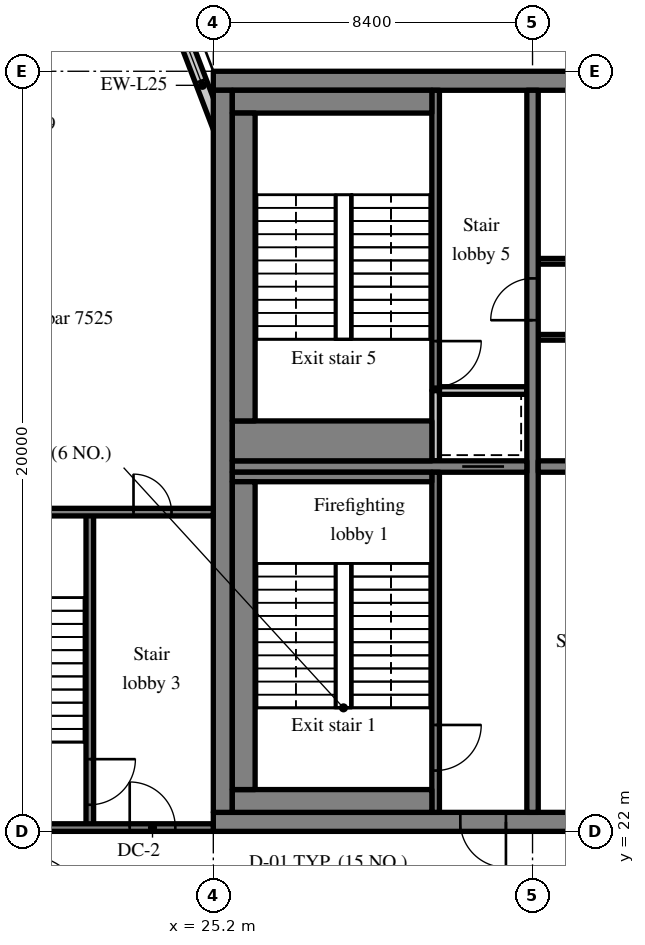
"""IFC4 building model, lengths in metres.
Left out: names, types, materials, properties, quantities, classifications, styles, units other than length and angle.
Written with IfcOpenShell. Run it as: python <this file> out.ifc"""

import sys

from ifc_helpers import new_model, si_unit, direction, frame, frame_2d, origin, place, context, subcontext, project, spatial, rectangle, extrude, source, transform, mapped, element, fill, save


model = new_model("IFC4")
c1 = context("Model", 3, precision=1e-05, world=origin(), true_north=direction((0.0, 1.0)))
c2 = subcontext(c1, "Body", "Model", "MODEL_VIEW")
j1 = project(units=[si_unit("LENGTHUNIT", "METRE"), si_unit("PLANEANGLEUNIT", "RADIAN")], contexts=[c1])
p1 = place(None, origin())
s1 = spatial("IfcSite", under=j1, at=p1, CompositionType="ELEMENT")
p2 = place(p1, origin())
s2 = spatial("IfcBuilding", under=s1, at=p2, CompositionType="ELEMENT")
p3 = place(p2, frame((0.0, 0.0, 313.7)))
s3 = spatial("IfcBuildingStorey", under=s2, at=p3, CompositionType="ELEMENT", Elevation=313.7)
m1 = source(origin(), c2, "Body", "SweptSolid", [
    extrude(rectangle(XDim=50.4, YDim=0.5, at=frame_2d((25.2, 0.0))), origin(), (0.0, 0.0, 1.0), 3.72),
])
p4 = place(p3, frame((25.2, 22.25, 0.0), z_axis=(0.0, 0.0, 1.0), x_axis=(1.0, 0.0, 0.0)))
e1 = element("IfcWall", 1, at=p4, inside=s3, PredefinedType="SHEAR", context=c2, shape_type="MappedRepresentation", body=[
    mapped(m1, transform((0.0, 0.0, 0.0), scale=1.0)),
])
m2 = source(origin(), c2, "Body", "SweptSolid", [
    extrude(rectangle(XDim=1.8, YDim=2.1, at=frame_2d((0.9, 1.05))), frame((0.0, 0.26, 0.0), z_axis=(0.0, -1.0, 0.0), x_axis=(1.0, 0.0, 0.0)), (0.0, 0.0, 1.0), 0.52),
])
p5 = place(p4, frame((15.9, 0.0, 0.0)))
e2 = element("IfcOpeningElement", 2, at=p5, cuts=e1, PredefinedType="OPENING", context=c2, shape_type="MappedRepresentation", body=[
    mapped(m2, transform((0.0, 0.0, 0.0), scale=1.0)),
])
m3 = source(origin(), c2, "Body", "SweptSolid", [
    extrude(rectangle(XDim=0.9, YDim=2.1, at=frame_2d((0.45, 1.05))), frame((0.0, 0.26, 0.0), z_axis=(0.0, -1.0, 0.0), x_axis=(1.0, 0.0, 0.0)), (0.0, 0.0, 1.0), 0.52),
])
p6 = place(p4, frame((9.675, 0.0, 0.0)))
e3 = element("IfcOpeningElement", 3, at=p6, cuts=e1, PredefinedType="OPENING", context=c2, shape_type="MappedRepresentation", body=[
    mapped(m3, transform((0.0, 0.0, 0.0), scale=1.0)),
])
p7 = place(p4, frame((21.525, 0.0, 0.0)))
e4 = element("IfcOpeningElement", 4, at=p7, cuts=e1, PredefinedType="OPENING", context=c2, shape_type="MappedRepresentation", body=[
    mapped(m3, transform((0.0, 0.0, 0.0), scale=1.0)),
])
p8 = place(p4, frame((32.7, 0.0, 0.0)))
e5 = element("IfcOpeningElement", 5, at=p8, cuts=e1, PredefinedType="OPENING", context=c2, shape_type="MappedRepresentation", body=[
    mapped(m2, transform((0.0, 0.0, 0.0), scale=1.0)),
])
m4 = source(origin(), c2, "Body", "SweptSolid", [
    extrude(rectangle(XDim=1.2, YDim=2.1, at=frame_2d((0.6, 1.05))), frame((0.0, 0.26, 0.0), z_axis=(0.0, -1.0, 0.0), x_axis=(1.0, 0.0, 0.0)), (0.0, 0.0, 1.0), 0.52),
])
p9 = place(p4, frame((6.5, 0.0, 0.0)))
e6 = element("IfcOpeningElement", 6, at=p9, cuts=e1, PredefinedType="OPENING", context=c2, shape_type="MappedRepresentation", body=[
    mapped(m4, transform((0.0, 0.0, 0.0), scale=1.0)),
])
p10 = place(p4, frame((47.975, 0.0, 0.0)))
e7 = element("IfcOpeningElement", 7, at=p10, cuts=e1, PredefinedType="OPENING", context=c2, shape_type="MappedRepresentation", body=[
    mapped(m4, transform((0.0, 0.0, 0.0), scale=1.0)),
])
p11 = place(p3, frame((25.2, 41.75, 0.0), z_axis=(0.0, 0.0, 1.0), x_axis=(1.0, 0.0, 0.0)))
e8 = element("IfcWall", 8, at=p11, inside=s3, PredefinedType="SHEAR", context=c2, shape_type="MappedRepresentation", body=[
    mapped(m1, transform((0.0, 0.0, 0.0), scale=1.0)),
])
m5 = source(origin(), c2, "Body", "SweptSolid", [
    extrude(rectangle(XDim=19.0, YDim=0.5, at=frame_2d((9.5, 0.0))), origin(), (0.0, 0.0, 1.0), 3.72),
])
p12 = place(p3, frame((25.45, 22.5, 0.0), z_axis=(0.0, 0.0, 1.0), x_axis=(0.0, 1.0, 0.0)))
e9 = element("IfcWall", 9, at=p12, inside=s3, PredefinedType="SHEAR", context=c2, shape_type="MappedRepresentation", body=[
    mapped(m5, transform((0.0, 0.0, 0.0), scale=1.0)),
])
m6 = source(origin(), c2, "Body", "SweptSolid", [
    extrude(rectangle(XDim=19.0, YDim=0.3, at=frame_2d((9.5, 0.0))), origin(), (0.0, 0.0, 1.0), 3.72),
])
p13 = place(p3, frame((33.6, 22.5, 0.0), z_axis=(0.0, 0.0, 1.0), x_axis=(0.0, 1.0, 0.0)))
e10 = element("IfcWall", 10, at=p13, inside=s3, PredefinedType="SHEAR", context=c2, shape_type="MappedRepresentation", body=[
    mapped(m6, transform((0.0, 0.0, 0.0), scale=1.0)),
])
m7 = source(origin(), c2, "Body", "SweptSolid", [
    extrude(rectangle(XDim=1.1, YDim=2.1, at=frame_2d((0.55, 1.05))), frame((0.0, 0.16, 0.0), z_axis=(0.0, -1.0, 0.0), x_axis=(1.0, 0.0, 0.0)), (0.0, 0.0, 1.0), 0.32),
])
p14 = place(p13, frame((12.95, 0.0, 0.0)))
e11 = element("IfcOpeningElement", 11, at=p14, cuts=e10, PredefinedType="OPENING", context=c2, shape_type="MappedRepresentation", body=[
    mapped(m7, transform((0.0, 0.0, 0.0), scale=1.0)),
])
m8 = source(origin(), c2, "Body", "SweptSolid", [
    extrude(rectangle(XDim=7.75, YDim=0.3, at=frame_2d((3.875, 0.0))), origin(), (0.0, 0.0, 1.0), 3.72),
])
p15 = place(p3, frame((25.7, 31.6, 0.0), z_axis=(0.0, 0.0, 1.0), x_axis=(1.0, 0.0, 0.0)))
e12 = element("IfcWall", 12, at=p15, inside=s3, PredefinedType="SHEAR", context=c2, shape_type="MappedRepresentation", body=[
    mapped(m8, transform((0.0, 0.0, 0.0), scale=1.0)),
])
p16 = place(p15, frame((6.05, 0.0, 0.0)))
e13 = element("IfcOpeningElement", 13, at=p16, cuts=e12, PredefinedType="OPENING", context=c2, shape_type="MappedRepresentation", body=[
    mapped(m7, transform((0.0, 0.0, 0.0), scale=1.0)),
])
m9 = source(origin(), c2, "Body", "SweptSolid", [
    extrude(rectangle(XDim=16.5, YDim=0.3, at=frame_2d((8.25, 0.0))), origin(), (0.0, 0.0, 1.0), 3.72),
])
p17 = place(p3, frame((33.75, 31.6, 0.0), z_axis=(0.0, 0.0, 1.0), x_axis=(1.0, 0.0, 0.0)))
e14 = element("IfcWall", 14, at=p17, inside=s3, PredefinedType="SHEAR", context=c2, shape_type="MappedRepresentation", body=[
    mapped(m9, transform((0.0, 0.0, 0.0), scale=1.0)),
])
m10 = source(origin(), c2, "Body", "SweptSolid", [
    extrude(rectangle(XDim=1.0, YDim=2.1, at=frame_2d((0.5, 1.05))), frame((0.0, 0.16, 0.0), z_axis=(0.0, -1.0, 0.0), x_axis=(1.0, 0.0, 0.0)), (0.0, 0.0, 1.0), 0.32),
])
p18 = place(p17, frame((14.875, 0.0, 0.0)))
e15 = element("IfcOpeningElement", 15, at=p18, cuts=e14, PredefinedType="OPENING", context=c2, shape_type="MappedRepresentation", body=[
    mapped(m10, transform((0.0, 0.0, 0.0), scale=1.0)),
])
m11 = source(origin(), c2, "Body", "SweptSolid", [
    extrude(rectangle(XDim=3.559, YDim=0.3, at=frame_2d((1.78, 0.0))), origin(), (0.0, 0.0, 1.0), 3.72),
])
p19 = place(p3, frame((25.55, 39.969, 0.0), z_axis=(0.0, 0.0, 1.0), x_axis=(-0.35779745313, 0.933799219604, 0.0)))
e16 = element("IfcWall", 16, at=p19, inside=s3, PredefinedType="SOLIDWALL", context=c2, shape_type="MappedRepresentation", body=[
    mapped(m11, transform((0.0, 0.0, 0.0), scale=1.0)),
])
m12 = source(origin(), c2, "Body", "SweptSolid", [
    extrude(rectangle(XDim=1.5, YDim=2.0, at=frame_2d((0.75, 1.0))), frame((0.0, 0.16, 0.0), z_axis=(0.0, -1.0, 0.0), x_axis=(1.0, 0.0, 0.0)), (0.0, 0.0, 1.0), 0.32),
])
p20 = place(p19, frame((1.903, 0.0, 0.9)))
e17 = element("IfcOpeningElement", 17, at=p20, cuts=e16, PredefinedType="OPENING", context=c2, shape_type="MappedRepresentation", body=[
    mapped(m12, transform((0.0, 0.0, 0.0), scale=1.0)),
])
m13 = source(origin(), c2, "Body", "SweptSolid", [
    extrude(rectangle(XDim=14.25, YDim=0.15, at=frame_2d((7.125, 0.0))), origin(), (0.0, 0.0, 1.0), 3.72),
])
p21 = place(p3, frame((33.75, 35.0, 0.0), z_axis=(0.0, 0.0, 1.0), x_axis=(1.0, 0.0, 0.0)))
e18 = element("IfcWall", 18, at=p21, inside=s3, PredefinedType="PARTITIONING", context=c2, shape_type="MappedRepresentation", body=[
    mapped(m13, transform((0.0, 0.0, 0.0), scale=1.0)),
])
m14 = source(origin(), c2, "Body", "SweptSolid", [
    extrude(rectangle(XDim=0.9, YDim=2.1, at=frame_2d((0.45, 1.05))), frame((0.0, 0.085, 0.0), z_axis=(0.0, -1.0, 0.0), x_axis=(1.0, 0.0, 0.0)), (0.0, 0.0, 1.0), 0.17),
])
p22 = place(p21, frame((0.968, 0.0, 0.0)))
e19 = element("IfcOpeningElement", 19, at=p22, cuts=e18, PredefinedType="OPENING", context=c2, shape_type="MappedRepresentation", body=[
    mapped(m14, transform((0.0, 0.0, 0.0), scale=1.0)),
])
p23 = place(p21, frame((5.929, 0.0, 0.0)))
e20 = element("IfcOpeningElement", 20, at=p23, cuts=e18, PredefinedType="OPENING", context=c2, shape_type="MappedRepresentation", body=[
    mapped(m14, transform((0.0, 0.0, 0.0), scale=1.0)),
])
p24 = place(p21, frame((11.599, 0.0, 0.0)))
e21 = element("IfcOpeningElement", 21, at=p24, cuts=e18, PredefinedType="OPENING", context=c2, shape_type="MappedRepresentation", body=[
    mapped(m14, transform((0.0, 0.0, 0.0), scale=1.0)),
])
m15 = source(origin(), c2, "Body", "SweptSolid", [
    extrude(rectangle(XDim=16.5, YDim=0.15, at=frame_2d((8.25, 0.0))), origin(), (0.0, 0.0, 1.0), 3.72),
])
p25 = place(p3, frame((33.75, 37.0, 0.0), z_axis=(0.0, 0.0, 1.0), x_axis=(1.0, 0.0, 0.0)))
e22 = element("IfcWall", 22, at=p25, inside=s3, PredefinedType="PARTITIONING", context=c2, shape_type="MappedRepresentation", body=[
    mapped(m15, transform((0.0, 0.0, 0.0), scale=1.0)),
])
p26 = place(p25, frame((6.563, 0.0, 0.0)))
e23 = element("IfcOpeningElement", 23, at=p26, cuts=e22, PredefinedType="OPENING", context=c2, shape_type="MappedRepresentation", body=[
    mapped(m14, transform((0.0, 0.0, 0.0), scale=1.0)),
])
p27 = place(p25, frame((14.813, 0.0, 0.0)))
e24 = element("IfcOpeningElement", 24, at=p27, cuts=e22, PredefinedType="OPENING", context=c2, shape_type="MappedRepresentation", body=[
    mapped(m14, transform((0.0, 0.0, 0.0), scale=1.0)),
])
m16 = source(origin(), c2, "Body", "SweptSolid", [
    extrude(rectangle(XDim=8.95, YDim=0.2, at=frame_2d((4.475, 0.0))), origin(), (0.0, 0.0, 1.0), 3.72),
])
p28 = place(p3, frame((31.05, 22.5, 0.0), z_axis=(0.0, 0.0, 1.0), x_axis=(0.0, 1.0, 0.0)))
e25 = element("IfcWall", 25, at=p28, inside=s3, PredefinedType="SOLIDWALL", context=c2, shape_type="MappedRepresentation", body=[
    mapped(m16, transform((0.0, 0.0, 0.0), scale=1.0)),
])
m17 = source(origin(), c2, "Body", "SweptSolid", [
    extrude(rectangle(XDim=1.2, YDim=2.1, at=frame_2d((0.6, 1.05))), frame((0.0, 0.11, 0.0), z_axis=(0.0, -1.0, 0.0), x_axis=(1.0, 0.0, 0.0)), (0.0, 0.0, 1.0), 0.22),
])
p29 = place(p28, frame((1.1, 0.0, 0.0)))
e26 = element("IfcOpeningElement", 26, at=p29, cuts=e25, PredefinedType="OPENING", context=c2, shape_type="MappedRepresentation", body=[
    mapped(m17, transform((0.0, 0.0, 0.0), scale=1.0)),
])
m18 = source(origin(), c2, "Body", "SweptSolid", [
    extrude(rectangle(XDim=1.85, YDim=0.2, at=frame_2d((0.925, 0.0))), origin(), (0.0, 0.0, 1.0), 3.72),
])
p30 = place(p3, frame((31.05, 31.75, 0.0), z_axis=(0.0, 0.0, 1.0), x_axis=(0.0, 1.0, 0.0)))
e27 = element("IfcWall", 27, at=p30, inside=s3, PredefinedType="SOLIDWALL", context=c2, shape_type="MappedRepresentation", body=[
    mapped(m18, transform((0.0, 0.0, 0.0), scale=1.0)),
])
m19 = source(origin(), c2, "Body", "SweptSolid", [
    extrude(rectangle(XDim=2.3, YDim=0.2, at=frame_2d((1.15, 0.0))), origin(), (0.0, 0.0, 1.0), 3.72),
])
p31 = place(p3, frame((31.15, 33.6, 0.0), z_axis=(0.0, 0.0, 1.0), x_axis=(1.0, 0.0, 0.0)))
e28 = element("IfcWall", 28, at=p31, inside=s3, PredefinedType="SOLIDWALL", context=c2, shape_type="MappedRepresentation", body=[
    mapped(m19, transform((0.0, 0.0, 0.0), scale=1.0)),
])
m20 = source(origin(), c2, "Body", "SweptSolid", [
    extrude(rectangle(XDim=7.9, YDim=0.2, at=frame_2d((3.95, 0.0))), origin(), (0.0, 0.0, 1.0), 3.72),
])
p32 = place(p3, frame((31.05, 33.6, 0.0), z_axis=(0.0, 0.0, 1.0), x_axis=(0.0, 1.0, 0.0)))
e29 = element("IfcWall", 29, at=p32, inside=s3, PredefinedType="SOLIDWALL", context=c2, shape_type="MappedRepresentation", body=[
    mapped(m20, transform((0.0, 0.0, 0.0), scale=1.0)),
])
p33 = place(p32, frame((0.1, 0.0, 0.0)))
e30 = element("IfcOpeningElement", 30, at=p33, cuts=e29, PredefinedType="OPENING", context=c2, shape_type="MappedRepresentation", body=[
    mapped(m17, transform((0.0, 0.0, 0.0), scale=1.0)),
])
m21 = source(origin(), c2, "Body", "SweptSolid", [
    extrude(rectangle(XDim=8.3, YDim=0.2, at=frame_2d((4.15, 0.0))), origin(), (0.0, 0.0, 1.0), 3.72),
])
p34 = place(p3, frame((21.95, 22.1, 0.0), z_axis=(0.0, 0.0, 1.0), x_axis=(0.0, 1.0, 0.0)))
e31 = element("IfcWall", 31, at=p34, inside=s3, PredefinedType="SOLIDWALL", context=c2, shape_type="MappedRepresentation", body=[
    mapped(m21, transform((0.0, 0.0, 0.0), scale=1.0)),
])
p35 = place(p34, frame((0.6, 0.0, 0.0)))
e32 = element("IfcOpeningElement", 32, at=p35, cuts=e31, PredefinedType="OPENING", context=c2, shape_type="MappedRepresentation", body=[
    mapped(m17, transform((0.0, 0.0, 0.0), scale=1.0)),
])
m22 = source(origin(), c2, "Body", "SweptSolid", [
    extrude(rectangle(XDim=8.15, YDim=0.2, at=frame_2d((4.075, 0.0))), origin(), (0.0, 0.0, 1.0), 3.72),
])
p36 = place(p3, frame((17.05, 22.1, 0.0), z_axis=(0.0, 0.0, 1.0), x_axis=(1.0, 0.0, 0.0)))
e33 = element("IfcWall", 33, at=p36, inside=s3, PredefinedType="SOLIDWALL", context=c2, shape_type="MappedRepresentation", body=[
    mapped(m22, transform((0.0, 0.0, 0.0), scale=1.0)),
])
p37 = place(p36, frame((5.95, 0.0, 0.0)))
e34 = element("IfcOpeningElement", 34, at=p37, cuts=e33, PredefinedType="OPENING", context=c2, shape_type="MappedRepresentation", body=[
    mapped(m17, transform((0.0, 0.0, 0.0), scale=1.0)),
])
p38 = place(p3, frame((17.05, 30.4, 0.0), z_axis=(0.0, 0.0, 1.0), x_axis=(1.0, 0.0, 0.0)))
e35 = element("IfcWall", 35, at=p38, inside=s3, PredefinedType="SOLIDWALL", context=c2, shape_type="MappedRepresentation", body=[
    mapped(m22, transform((0.0, 0.0, 0.0), scale=1.0)),
])
m23 = source(origin(), c2, "Body", "SweptSolid", [
    extrude(rectangle(XDim=1.0, YDim=2.1, at=frame_2d((0.5, 1.05))), frame((0.0, 0.11, 0.0), z_axis=(0.0, -1.0, 0.0), x_axis=(1.0, 0.0, 0.0)), (0.0, 0.0, 1.0), 0.22),
])
p39 = place(p38, frame((6.05, 0.0, 0.0)))
e36 = element("IfcOpeningElement", 36, at=p39, cuts=e35, PredefinedType="OPENING", context=c2, shape_type="MappedRepresentation", body=[
    mapped(m23, transform((0.0, 0.0, 0.0), scale=1.0)),
])
m24 = source(origin(), c2, "Body", "SweptSolid", [
    extrude(rectangle(XDim=5.25, YDim=0.6, at=frame_2d((2.625, 0.0))), origin(), (0.0, 0.0, 1.0), 3.72),
])
p40 = place(p3, frame((25.7, 22.8, 0.0), z_axis=(0.0, 0.0, 1.0), x_axis=(1.0, 0.0, 0.0)))
e37 = element("IfcWall", 37, at=p40, inside=s3, PredefinedType="SOLIDWALL", context=c2, shape_type="MappedRepresentation", body=[
    mapped(m24, transform((0.0, 0.0, 0.0), scale=1.0)),
])
m25 = source(origin(), c2, "Body", "SweptSolid", [
    extrude(rectangle(XDim=5.25, YDim=0.25, at=frame_2d((2.625, 0.0))), origin(), (0.0, 0.0, 1.0), 3.72),
])
p41 = place(p3, frame((25.7, 31.325, 0.0), z_axis=(0.0, 0.0, 1.0), x_axis=(1.0, 0.0, 0.0)))
e38 = element("IfcWall", 38, at=p41, inside=s3, PredefinedType="SOLIDWALL", context=c2, shape_type="MappedRepresentation", body=[
    mapped(m25, transform((0.0, 0.0, 0.0), scale=1.0)),
])
m26 = source(origin(), c2, "Body", "SweptSolid", [
    extrude(rectangle(XDim=8.1, YDim=0.6, at=frame_2d((4.05, 0.0))), origin(), (0.0, 0.0, 1.0), 3.72),
])
p42 = place(p3, frame((26.0, 23.1, 0.0), z_axis=(0.0, 0.0, 1.0), x_axis=(0.0, 1.0, 0.0)))
e39 = element("IfcWall", 39, at=p42, inside=s3, PredefinedType="SOLIDWALL", context=c2, shape_type="MappedRepresentation", body=[
    mapped(m26, transform((0.0, 0.0, 0.0), scale=1.0)),
])
p43 = place(p3, frame((25.7, 41.2, 0.0), z_axis=(0.0, 0.0, 1.0), x_axis=(1.0, 0.0, 0.0)))
e40 = element("IfcWall", 40, at=p43, inside=s3, PredefinedType="SOLIDWALL", context=c2, shape_type="MappedRepresentation", body=[
    mapped(m24, transform((0.0, 0.0, 0.0), scale=1.0)),
])
m27 = source(origin(), c2, "Body", "SweptSolid", [
    extrude(rectangle(XDim=5.25, YDim=1.05, at=frame_2d((2.625, 0.0))), origin(), (0.0, 0.0, 1.0), 3.72),
])
p44 = place(p3, frame((25.7, 32.275, 0.0), z_axis=(0.0, 0.0, 1.0), x_axis=(1.0, 0.0, 0.0)))
e41 = element("IfcWall", 41, at=p44, inside=s3, PredefinedType="SOLIDWALL", context=c2, shape_type="MappedRepresentation", body=[
    mapped(m27, transform((0.0, 0.0, 0.0), scale=1.0)),
])
p45 = place(p3, frame((26.0, 32.8, 0.0), z_axis=(0.0, 0.0, 1.0), x_axis=(0.0, 1.0, 0.0)))
e42 = element("IfcWall", 42, at=p45, inside=s3, PredefinedType="SOLIDWALL", context=c2, shape_type="MappedRepresentation", body=[
    mapped(m26, transform((0.0, 0.0, 0.0), scale=1.0)),
])
m28 = source(origin(), c2, "Body", "SweptSolid", [
    extrude(rectangle(XDim=1.5, YDim=2.0, at=frame_2d((0.75, 1.0))), frame((0.0, 0.03, 0.0), z_axis=(0.0, -1.0, 0.0), x_axis=(1.0, 0.0, 0.0)), (0.0, 0.0, 1.0), 0.06),
])
p46 = place(p20, origin())
e43 = element("IfcWindow", 43, at=p46, inside=s3, PartitioningType="SINGLE_PANEL", PredefinedType="WINDOW", context=c2, shape_type="MappedRepresentation", body=[
    mapped(m28, transform((0.0, 0.0, 0.0), scale=1.0)),
])
fill(e17, e43)
m29 = source(origin(), c2, "Body", "SweptSolid", [
    extrude(rectangle(XDim=1.2, YDim=2.1, at=frame_2d((0.6, 1.05))), frame((0.0, 0.025, 0.0), z_axis=(0.0, -1.0, 0.0), x_axis=(1.0, 0.0, 0.0)), (0.0, 0.0, 1.0), 0.05),
])
p47 = place(p29, origin())
e44 = element("IfcDoor", 44, at=p47, inside=s3, OperationType="SINGLE_SWING_RIGHT", PredefinedType="DOOR", context=c2, shape_type="MappedRepresentation", body=[
    mapped(m29, transform((0.0, 0.0, 0.0), scale=1.0)),
])
fill(e26, e44)
m30 = source(origin(), c2, "Body", "SweptSolid", [
    extrude(rectangle(XDim=1.2, YDim=2.1, at=frame_2d((0.6, 1.05))), frame((0.0, 0.175, 0.0), z_axis=(0.0, -1.0, 0.0), x_axis=(1.0, 0.0, 0.0)), (0.0, 0.0, 1.0), 0.05),
])
p48 = place(p9, origin())
e45 = element("IfcDoor", 45, at=p48, inside=s3, OperationType="SINGLE_SWING_RIGHT", PredefinedType="DOOR", context=c2, shape_type="MappedRepresentation", body=[
    mapped(m30, transform((0.0, 0.0, 0.0), scale=1.0)),
])
fill(e6, e45)
m31 = source(origin(), c2, "Body", "SweptSolid", [
    extrude(rectangle(XDim=1.1, YDim=2.1, at=frame_2d((0.55, 1.05))), frame((0.0, 0.025, 0.0), z_axis=(0.0, -1.0, 0.0), x_axis=(1.0, 0.0, 0.0)), (0.0, 0.0, 1.0), 0.05),
])
p49 = place(p16, origin())
e46 = element("IfcDoor", 46, at=p49, inside=s3, OperationType="SLIDING_TO_RIGHT", PredefinedType="DOOR", context=c2, shape_type="MappedRepresentation", body=[
    mapped(m31, transform((0.0, 0.0, 0.0), scale=1.0)),
])
fill(e13, e46)
p50 = place(p33, origin())
e47 = element("IfcDoor", 47, at=p50, inside=s3, OperationType="SINGLE_SWING_RIGHT", PredefinedType="DOOR", context=c2, shape_type="MappedRepresentation", body=[
    mapped(m29, transform((0.0, 0.0, 0.0), scale=1.0)),
])
fill(e30, e47)
p51 = place(p35, origin())
e48 = element("IfcDoor", 48, at=p51, inside=s3, OperationType="SINGLE_SWING_RIGHT", PredefinedType="DOOR", context=c2, shape_type="MappedRepresentation", body=[
    mapped(m29, transform((0.0, 0.0, 0.0), scale=1.0)),
])
fill(e32, e48)
p52 = place(p37, origin())
e49 = element("IfcDoor", 49, at=p52, inside=s3, OperationType="SINGLE_SWING_LEFT", PredefinedType="DOOR", context=c2, shape_type="MappedRepresentation", body=[
    mapped(m29, transform((0.0, 0.0, 0.0), scale=1.0)),
])
fill(e34, e49)
m32 = source(origin(), c2, "Body", "SweptSolid", [
    extrude(rectangle(XDim=1.0, YDim=2.1, at=frame_2d((0.5, 1.05))), frame((0.0, 0.025, 0.0), z_axis=(0.0, -1.0, 0.0), x_axis=(1.0, 0.0, 0.0)), (0.0, 0.0, 1.0), 0.05),
])
p53 = place(p39, origin())
e50 = element("IfcDoor", 50, at=p53, inside=s3, OperationType="SINGLE_SWING_LEFT", PredefinedType="DOOR", context=c2, shape_type="MappedRepresentation", body=[
    mapped(m32, transform((0.0, 0.0, 0.0), scale=1.0)),
])
fill(e36, e50)
p54 = place(p14, origin())
e51 = element("IfcDoor", 51, at=p54, inside=s3, OperationType="SINGLE_SWING_LEFT", PredefinedType="DOOR", context=c2, shape_type="MappedRepresentation", body=[
    mapped(m31, transform((0.0, 0.0, 0.0), scale=1.0)),
])
fill(e11, e51)
save(model, sys.argv[1])
